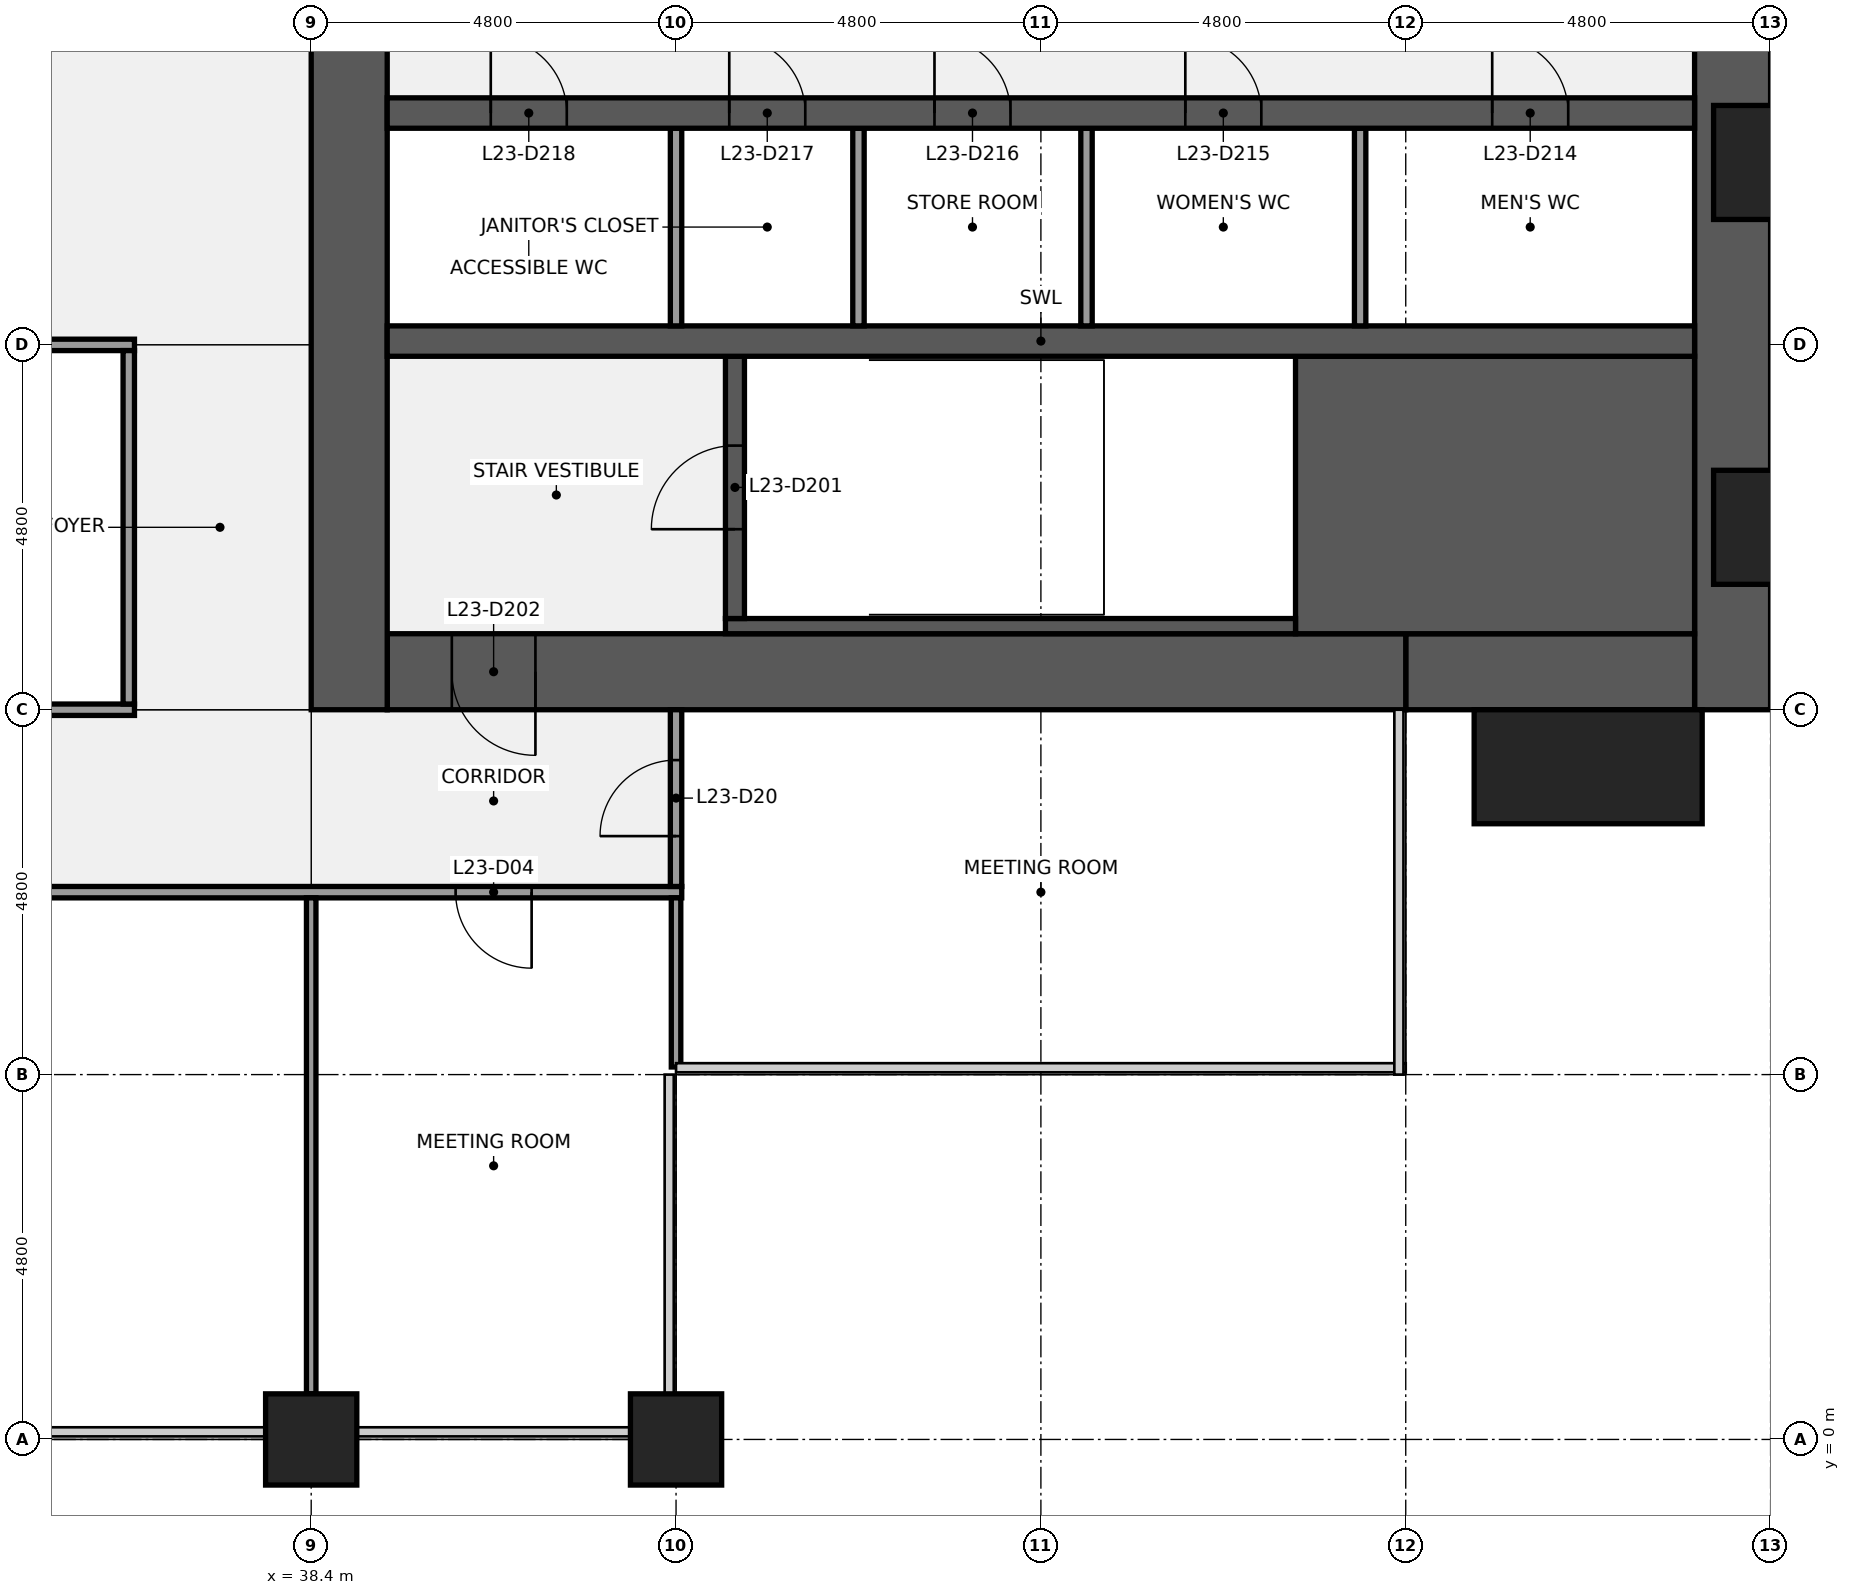
"""IFC4 building model, lengths in metres.
Left out: names, types, materials, properties, quantities, classifications, styles, units other than length and angle.
Written with IfcOpenShell. Run it as: python <this file> out.ifc"""

import sys

from ifc_helpers import new_model, si_unit, direction, frame, frame_2d, origin, origin_2d, place, context, subcontext, project, spatial, rectangle, extrude, element, fill, save


model = new_model("IFC4")
c1 = context("Model", 3, precision=1e-05, world=origin(), true_north=direction((0.0, 1.0)))
c2 = subcontext(c1, "Body", "Model", "MODEL_VIEW")
j1 = project(units=[si_unit("LENGTHUNIT", "METRE"), si_unit("PLANEANGLEUNIT", "RADIAN")], contexts=[c1])
p1 = place(None, origin())
s1 = spatial("IfcSite", under=j1, at=p1, CompositionType="ELEMENT")
p2 = place(p1, origin())
s2 = spatial("IfcBuilding", under=s1, at=p2, CompositionType="ELEMENT")
p3 = place(p2, frame((0.0, 0.0, 112.1)))
s3 = spatial("IfcBuildingStorey", under=s2, at=p3, CompositionType="ELEMENT", Elevation=112.1)
for number, where, z_axis, x_axis in (
    (1, (38.4, 0.0, 0.0), (0.0, 0.0, 1.0), (1.0, 0.0, 0.0)),
    (2, (43.2, 0.0, 0.0), (0.0, 0.0, 1.0), (1.0, 0.0, 0.0)),
):
    element("IfcColumn", number, at=place(p3, frame(where, z_axis=z_axis, x_axis=x_axis)), inside=s3, PredefinedType="COLUMN", context=c2, shape_type="SweptSolid", body=[
        extrude(rectangle(XDim=1.2, YDim=1.2, at=origin_2d()), origin(), (0.0, 0.0, 1.0), 4.0),
    ])
p4 = place(p3, frame((57.1, 38.4, 0.0), z_axis=(0.0, 0.0, 1.0), x_axis=(0.0, -1.0, 0.0)))
e3 = element("IfcWall", 3, at=p4, inside=s3, PredefinedType="SHEAR", context=c2, shape_type="SweptSolid", body=[
    extrude(rectangle(XDim=28.8, YDim=1.0, at=frame_2d((14.4, 0.0))), origin(), (0.0, 0.0, 1.0), 3.84),
])
p5 = place(p4, frame((18.45, 0.0, 0.9)))
e4 = element("IfcOpeningElement", 4, at=p5, cuts=e3, PredefinedType="OPENING", context=c2, shape_type="SweptSolid", body=[
    extrude(rectangle(XDim=1.5, YDim=1.5, at=frame_2d((0.75, 0.75))), frame((0.0, 0.51, 0.0), z_axis=(0.0, -1.0, 0.0), x_axis=(1.0, 0.0, 0.0)), (0.0, 0.0, 1.0), 1.02),
])
p6 = place(p4, frame((8.85, 0.0, 0.9)))
e5 = element("IfcOpeningElement", 5, at=p6, cuts=e3, PredefinedType="OPENING", context=c2, shape_type="SweptSolid", body=[
    extrude(rectangle(XDim=1.5, YDim=1.5, at=frame_2d((0.75, 0.75))), frame((0.0, 0.51, 0.0), z_axis=(0.0, -1.0, 0.0), x_axis=(1.0, 0.0, 0.0)), (0.0, 0.0, 1.0), 1.02),
])
p7 = place(p3, frame((56.6, 10.1, 0.0), z_axis=(0.0, 0.0, 1.0), x_axis=(-1.0, 0.0, 0.0)))
e6 = element("IfcWall", 6, at=p7, inside=s3, PredefinedType="SHEAR", context=c2, shape_type="SweptSolid", body=[
    extrude(rectangle(XDim=3.8, YDim=1.0, at=frame_2d((1.9, 0.0))), origin(), (0.0, 0.0, 1.0), 3.84),
])
p8 = place(p3, frame((52.8, 10.1, 0.0), z_axis=(0.0, 0.0, 1.0), x_axis=(-1.0, 0.0, 0.0)))
e7 = element("IfcWall", 7, at=p8, inside=s3, PredefinedType="SHEAR", context=c2, shape_type="SweptSolid", body=[
    extrude(rectangle(XDim=13.4, YDim=1.0, at=frame_2d((6.7, 0.0))), origin(), (0.0, 0.0, 1.0), 3.84),
])
p9 = place(p8, frame((11.45, 0.0, 0.0)))
e8 = element("IfcOpeningElement", 8, at=p9, cuts=e7, PredefinedType="OPENING", context=c2, shape_type="SweptSolid", body=[
    extrude(rectangle(XDim=1.1, YDim=2.1, at=frame_2d((0.55, 1.05))), frame((0.0, 0.51, 0.0), z_axis=(0.0, -1.0, 0.0), x_axis=(1.0, 0.0, 0.0)), (0.0, 0.0, 1.0), 1.02),
])
p10 = place(p3, frame((38.9, 9.6, 0.0), z_axis=(0.0, 0.0, 1.0), x_axis=(0.0, 1.0, 0.0)))
e9 = element("IfcWall", 9, at=p10, inside=s3, PredefinedType="SHEAR", context=c2, shape_type="SweptSolid", body=[
    extrude(rectangle(XDim=28.8, YDim=1.0, at=frame_2d((14.4, 0.0))), origin(), (0.0, 0.0, 1.0), 3.84),
])
p11 = place(p10, frame((8.7, 0.0, 0.0)))
e10 = element("IfcOpeningElement", 10, at=p11, cuts=e9, PredefinedType="OPENING", context=c2, shape_type="SweptSolid", body=[
    extrude(rectangle(XDim=1.8, YDim=2.1, at=frame_2d((0.9, 1.05))), frame((0.0, 0.51, 0.0), z_axis=(0.0, -1.0, 0.0), x_axis=(1.0, 0.0, 0.0)), (0.0, 0.0, 1.0), 1.02),
])
p12 = place(p10, frame((18.3, 0.0, 0.0)))
e11 = element("IfcOpeningElement", 11, at=p12, cuts=e9, PredefinedType="OPENING", context=c2, shape_type="SweptSolid", body=[
    extrude(rectangle(XDim=1.8, YDim=2.1, at=frame_2d((0.9, 1.05))), frame((0.0, 0.51, 0.0), z_axis=(0.0, -1.0, 0.0), x_axis=(1.0, 0.0, 0.0)), (0.0, 0.0, 1.0), 1.02),
])
p13 = place(p3, frame((51.35, 12.425, 0.0), z_axis=(0.0, 0.0, 1.0), x_axis=(1.0, 0.0, 0.0)))
e12 = element("IfcWall", 12, at=p13, inside=s3, PredefinedType="SHEAR", context=c2, shape_type="SweptSolid", body=[
    extrude(rectangle(XDim=5.25, YDim=3.65, at=frame_2d((2.625, 0.0))), origin(), (0.0, 0.0, 1.0), 3.84),
])
p14 = place(p3, frame((43.85, 10.7, 0.0), z_axis=(0.0, 0.0, 1.0), x_axis=(1.0, 0.0, 0.0)))
e13 = element("IfcWall", 13, at=p14, inside=s3, PredefinedType="SHEAR", context=c2, shape_type="SweptSolid", body=[
    extrude(rectangle(XDim=7.5, YDim=0.2, at=frame_2d((3.75, 0.0))), origin(), (0.0, 0.0, 1.0), 3.84),
])
p15 = place(p3, frame((43.975, 10.8, 0.0), z_axis=(0.0, 0.0, 1.0), x_axis=(0.0, 1.0, 0.0)))
e14 = element("IfcWall", 14, at=p15, inside=s3, PredefinedType="SHEAR", context=c2, shape_type="SweptSolid", body=[
    extrude(rectangle(XDim=3.45, YDim=0.25, at=frame_2d((1.725, 0.0))), origin(), (0.0, 0.0, 1.0), 3.84),
])
p16 = place(p15, frame((1.175, 0.0, 0.0)))
e15 = element("IfcOpeningElement", 15, at=p16, cuts=e14, PredefinedType="OPENING", context=c2, shape_type="SweptSolid", body=[
    extrude(rectangle(XDim=1.1, YDim=2.1, at=frame_2d((0.55, 1.05))), frame((0.0, 0.135, 0.0), z_axis=(0.0, -1.0, 0.0), x_axis=(1.0, 0.0, 0.0)), (0.0, 0.0, 1.0), 0.27),
])
p17 = place(p3, frame((39.4, 14.45, 0.0), z_axis=(0.0, 0.0, 1.0), x_axis=(1.0, 0.0, 0.0)))
e16 = element("IfcWall", 16, at=p17, inside=s3, PredefinedType="SHEAR", context=c2, shape_type="SweptSolid", body=[
    extrude(rectangle(XDim=17.2, YDim=0.4, at=frame_2d((8.6, 0.0))), origin(), (0.0, 0.0, 1.0), 3.84),
])
for number, where, z_axis, x_axis in (
    (17, (52.2, 14.65, 0.0), (0.0, 0.0, 1.0), (0.0, 1.0, 0.0)),
    (18, (48.6, 14.65, 0.0), (0.0, 0.0, 1.0), (0.0, 1.0, 0.0)),
    (19, (45.6, 14.65, 0.0), (0.0, 0.0, 1.0), (0.0, 1.0, 0.0)),
    (20, (43.2, 14.65, 0.0), (0.0, 0.0, 1.0), (0.0, 1.0, 0.0)),
):
    element("IfcWall", number, at=place(p3, frame(where, z_axis=z_axis, x_axis=x_axis)), inside=s3, PredefinedType="PARTITIONING", context=c2, shape_type="SweptSolid", body=[
        extrude(rectangle(XDim=2.6, YDim=0.15, at=frame_2d((1.3, 0.0))), origin(), (0.0, 0.0, 1.0), 3.84),
    ])
p18 = place(p3, frame((39.4, 17.45, 0.0), z_axis=(0.0, 0.0, 1.0), x_axis=(1.0, 0.0, 0.0)))
e21 = element("IfcWall", 21, at=p18, inside=s3, PredefinedType="SHEAR", context=c2, shape_type="SweptSolid", body=[
    extrude(rectangle(XDim=17.2, YDim=0.4, at=frame_2d((8.6, 0.0))), origin(), (0.0, 0.0, 1.0), 3.84),
])
p19 = place(p18, frame((14.538, 0.0, 0.0)))
e22 = element("IfcOpeningElement", 22, at=p19, cuts=e21, PredefinedType="OPENING", context=c2, shape_type="SweptSolid", body=[
    extrude(rectangle(XDim=1.0, YDim=2.1, at=frame_2d((0.5, 1.05))), frame((0.0, 0.21, 0.0), z_axis=(0.0, -1.0, 0.0), x_axis=(1.0, 0.0, 0.0)), (0.0, 0.0, 1.0), 0.42),
])
p20 = place(p18, frame((10.5, 0.0, 0.0)))
e23 = element("IfcOpeningElement", 23, at=p20, cuts=e21, PredefinedType="OPENING", context=c2, shape_type="SweptSolid", body=[
    extrude(rectangle(XDim=1.0, YDim=2.1, at=frame_2d((0.5, 1.05))), frame((0.0, 0.21, 0.0), z_axis=(0.0, -1.0, 0.0), x_axis=(1.0, 0.0, 0.0)), (0.0, 0.0, 1.0), 0.42),
])
p21 = place(p18, frame((7.2, 0.0, 0.0)))
e24 = element("IfcOpeningElement", 24, at=p21, cuts=e21, PredefinedType="OPENING", context=c2, shape_type="SweptSolid", body=[
    extrude(rectangle(XDim=1.0, YDim=2.1, at=frame_2d((0.5, 1.05))), frame((0.0, 0.21, 0.0), z_axis=(0.0, -1.0, 0.0), x_axis=(1.0, 0.0, 0.0)), (0.0, 0.0, 1.0), 0.42),
])
p22 = place(p18, frame((4.5, 0.0, 0.0)))
e25 = element("IfcOpeningElement", 25, at=p22, cuts=e21, PredefinedType="OPENING", context=c2, shape_type="SweptSolid", body=[
    extrude(rectangle(XDim=1.0, YDim=2.1, at=frame_2d((0.5, 1.05))), frame((0.0, 0.21, 0.0), z_axis=(0.0, -1.0, 0.0), x_axis=(1.0, 0.0, 0.0)), (0.0, 0.0, 1.0), 0.42),
])
p23 = place(p18, frame((1.363, 0.0, 0.0)))
e26 = element("IfcOpeningElement", 26, at=p23, cuts=e21, PredefinedType="OPENING", context=c2, shape_type="SweptSolid", body=[
    extrude(rectangle(XDim=1.0, YDim=2.1, at=frame_2d((0.5, 1.05))), frame((0.0, 0.21, 0.0), z_axis=(0.0, -1.0, 0.0), x_axis=(1.0, 0.0, 0.0)), (0.0, 0.0, 1.0), 0.42),
])
p24 = place(p3, frame((14.325, 7.2, 0.0), z_axis=(0.0, 0.0, 1.0), x_axis=(1.0, 0.0, 0.0)))
e27 = element("IfcWall", 27, at=p24, inside=s3, PredefinedType="PARTITIONING", context=c2, shape_type="SweptSolid", body=[
    extrude(rectangle(XDim=28.95, YDim=0.15, at=frame_2d((14.475, 0.0))), origin(), (0.0, 0.0, 1.0), 2.849),
])
p25 = place(p24, frame((1.975, 0.0, 0.0)))
e28 = element("IfcOpeningElement", 28, at=p25, cuts=e27, PredefinedType="OPENING", context=c2, shape_type="SweptSolid", body=[
    extrude(rectangle(XDim=1.0, YDim=2.1, at=frame_2d((0.5, 1.05))), frame((0.0, 0.085, 0.0), z_axis=(0.0, -1.0, 0.0), x_axis=(1.0, 0.0, 0.0)), (0.0, 0.0, 1.0), 0.17),
])
p26 = place(p24, frame((9.175, 0.0, 0.0)))
e29 = element("IfcOpeningElement", 29, at=p26, cuts=e27, PredefinedType="OPENING", context=c2, shape_type="SweptSolid", body=[
    extrude(rectangle(XDim=1.0, YDim=2.1, at=frame_2d((0.5, 1.05))), frame((0.0, 0.085, 0.0), z_axis=(0.0, -1.0, 0.0), x_axis=(1.0, 0.0, 0.0)), (0.0, 0.0, 1.0), 0.17),
])
p27 = place(p24, frame((18.775, 0.0, 0.0)))
e30 = element("IfcOpeningElement", 30, at=p27, cuts=e27, PredefinedType="OPENING", context=c2, shape_type="SweptSolid", body=[
    extrude(rectangle(XDim=1.0, YDim=2.1, at=frame_2d((0.5, 1.05))), frame((0.0, 0.085, 0.0), z_axis=(0.0, -1.0, 0.0), x_axis=(1.0, 0.0, 0.0)), (0.0, 0.0, 1.0), 0.17),
])
p28 = place(p24, frame((25.975, 0.0, 0.0)))
e31 = element("IfcOpeningElement", 31, at=p28, cuts=e27, PredefinedType="OPENING", context=c2, shape_type="SweptSolid", body=[
    extrude(rectangle(XDim=1.0, YDim=2.1, at=frame_2d((0.5, 1.05))), frame((0.0, 0.085, 0.0), z_axis=(0.0, -1.0, 0.0), x_axis=(1.0, 0.0, 0.0)), (0.0, 0.0, 1.0), 0.17),
])
p29 = place(p3, frame((21.525, 9.6, 0.0), z_axis=(0.0, 0.0, 1.0), x_axis=(1.0, 0.0, 0.0)))
e32 = element("IfcWall", 32, at=p29, inside=s3, PredefinedType="PARTITIONING", context=c2, shape_type="SweptSolid", body=[
    extrude(rectangle(XDim=14.55, YDim=0.15, at=frame_2d((7.275, 0.0))), origin(), (0.0, 0.0, 1.0), 2.849),
])
p30 = place(p29, frame((3.175, 0.0, 0.0)))
e33 = element("IfcOpeningElement", 33, at=p30, cuts=e32, PredefinedType="OPENING", context=c2, shape_type="SweptSolid", body=[
    extrude(rectangle(XDim=1.0, YDim=2.1, at=frame_2d((0.5, 1.05))), frame((0.0, 0.085, 0.0), z_axis=(0.0, -1.0, 0.0), x_axis=(1.0, 0.0, 0.0)), (0.0, 0.0, 1.0), 0.17),
])
p31 = place(p29, frame((10.375, 0.0, 0.0)))
e34 = element("IfcOpeningElement", 34, at=p31, cuts=e32, PredefinedType="OPENING", context=c2, shape_type="SweptSolid", body=[
    extrude(rectangle(XDim=1.0, YDim=2.1, at=frame_2d((0.5, 1.05))), frame((0.0, 0.085, 0.0), z_axis=(0.0, -1.0, 0.0), x_axis=(1.0, 0.0, 0.0)), (0.0, 0.0, 1.0), 0.17),
])
p32 = place(p3, frame((33.675, 14.4, 0.0), z_axis=(0.0, 0.0, 1.0), x_axis=(1.0, 0.0, 0.0)))
e35 = element("IfcWall", 35, at=p32, inside=s3, PredefinedType="PARTITIONING", context=c2, shape_type="SweptSolid", body=[
    extrude(rectangle(XDim=2.4, YDim=0.15, at=frame_2d((1.2, 0.0))), origin(), (0.0, 0.0, 1.0), 2.849),
])
p33 = place(p3, frame((36.0, 9.675, 0.0), z_axis=(0.0, 0.0, 1.0), x_axis=(0.0, 1.0, 0.0)))
e36 = element("IfcWall", 36, at=p33, inside=s3, PredefinedType="PARTITIONING", context=c2, shape_type="SweptSolid", body=[
    extrude(rectangle(XDim=4.65, YDim=0.15, at=frame_2d((2.325, 0.0))), origin(), (0.0, 0.0, 1.0), 2.849),
])
p34 = place(p3, frame((38.4, 0.6, 0.0), z_axis=(0.0, 0.0, 1.0), x_axis=(0.0, 1.0, 0.0)))
e37 = element("IfcWall", 37, at=p34, inside=s3, PredefinedType="PARTITIONING", context=c2, shape_type="SweptSolid", body=[
    extrude(rectangle(XDim=6.525, YDim=0.125, at=frame_2d((3.262, 0.0))), origin(), (0.0, 0.0, 1.0), 2.849),
])
p35 = place(p3, frame((43.2, 4.9, 0.0), z_axis=(0.0, 0.0, 1.0), x_axis=(0.0, 1.0, 0.0)))
e38 = element("IfcWall", 38, at=p35, inside=s3, PredefinedType="PARTITIONING", context=c2, shape_type="SweptSolid", body=[
    extrude(rectangle(XDim=2.225, YDim=0.125, at=frame_2d((1.113, 0.0))), origin(), (0.0, 0.0, 1.0), 2.849),
])
p36 = place(p3, frame((43.2, 7.275, 0.0), z_axis=(0.0, 0.0, 1.0), x_axis=(0.0, 1.0, 0.0)))
e39 = element("IfcWall", 39, at=p36, inside=s3, PredefinedType="PARTITIONING", context=c2, shape_type="SweptSolid", body=[
    extrude(rectangle(XDim=2.325, YDim=0.15, at=frame_2d((1.163, 0.0))), origin(), (0.0, 0.0, 1.0), 2.849),
])
p37 = place(p36, frame((0.663, 0.0, 0.0)))
e40 = element("IfcOpeningElement", 40, at=p37, cuts=e39, PredefinedType="OPENING", context=c2, shape_type="SweptSolid", body=[
    extrude(rectangle(XDim=1.0, YDim=2.1, at=frame_2d((0.5, 1.05))), frame((0.0, 0.085, 0.0), z_axis=(0.0, -1.0, 0.0), x_axis=(1.0, 0.0, 0.0)), (0.0, 0.0, 1.0), 0.17),
])
p38 = place(p3, frame((55.2, 8.85, 0.0), z_axis=(0.0, 0.0, 1.0), x_axis=(1.0, 0.0, 0.0)))
e41 = element("IfcColumn", 41, at=p38, inside=s3, PredefinedType="PILASTER", context=c2, shape_type="SweptSolid", body=[
    extrude(rectangle(XDim=3.0, YDim=1.5, at=origin_2d()), origin(), (0.0, 0.0, 1.0), 4.0),
])
for number, where, z_axis, x_axis in (
    (42, (38.4, -1.05, 0.0), (0.0, 0.0, 1.0), (1.0, 0.0, 0.0)),
    (43, (43.2, -1.05, 0.0), (0.0, 0.0, 1.0), (1.0, 0.0, 0.0)),
):
    element("IfcColumn", number, at=place(p3, frame(where, z_axis=z_axis, x_axis=x_axis)), inside=s3, PredefinedType="PILASTER", context=c2, shape_type="SweptSolid", body=[
        extrude(rectangle(XDim=3.6, YDim=0.9, at=origin_2d()), origin(), (0.0, 0.0, 1.0), 4.0),
    ])
p39 = place(p16, origin())
e44 = element("IfcDoor", 44, at=p39, inside=s3, OperationType="SINGLE_SWING_LEFT", PredefinedType="DOOR", context=c2, shape_type="SweptSolid", body=[
    extrude(rectangle(XDim=1.1, YDim=2.1, at=frame_2d((0.55, 1.05))), frame((0.0, 0.025, 0.0), z_axis=(0.0, -1.0, 0.0), x_axis=(1.0, 0.0, 0.0)), (0.0, 0.0, 1.0), 0.05),
])
fill(e15, e44)
p40 = place(p9, origin())
e45 = element("IfcDoor", 45, at=p40, inside=s3, OperationType="SINGLE_SWING_LEFT", PredefinedType="DOOR", context=c2, shape_type="SweptSolid", body=[
    extrude(rectangle(XDim=1.1, YDim=2.1, at=frame_2d((0.55, 1.05))), frame((0.0, 0.025, 0.0), z_axis=(0.0, -1.0, 0.0), x_axis=(1.0, 0.0, 0.0)), (0.0, 0.0, 1.0), 0.05),
])
fill(e8, e45)
p41 = place(p19, origin())
e46 = element("IfcDoor", 46, at=p41, inside=s3, OperationType="SINGLE_SWING_LEFT", PredefinedType="DOOR", context=c2, shape_type="SweptSolid", body=[
    extrude(rectangle(XDim=1.0, YDim=2.1, at=frame_2d((0.5, 1.05))), frame((0.0, 0.025, 0.0), z_axis=(0.0, -1.0, 0.0), x_axis=(1.0, 0.0, 0.0)), (0.0, 0.0, 1.0), 0.05),
])
fill(e22, e46)
p42 = place(p20, origin())
e47 = element("IfcDoor", 47, at=p42, inside=s3, OperationType="SINGLE_SWING_LEFT", PredefinedType="DOOR", context=c2, shape_type="SweptSolid", body=[
    extrude(rectangle(XDim=1.0, YDim=2.1, at=frame_2d((0.5, 1.05))), frame((0.0, 0.025, 0.0), z_axis=(0.0, -1.0, 0.0), x_axis=(1.0, 0.0, 0.0)), (0.0, 0.0, 1.0), 0.05),
])
fill(e23, e47)
p43 = place(p21, origin())
e48 = element("IfcDoor", 48, at=p43, inside=s3, OperationType="SINGLE_SWING_LEFT", PredefinedType="DOOR", context=c2, shape_type="SweptSolid", body=[
    extrude(rectangle(XDim=1.0, YDim=2.1, at=frame_2d((0.5, 1.05))), frame((0.0, 0.025, 0.0), z_axis=(0.0, -1.0, 0.0), x_axis=(1.0, 0.0, 0.0)), (0.0, 0.0, 1.0), 0.05),
])
fill(e24, e48)
p44 = place(p22, origin())
e49 = element("IfcDoor", 49, at=p44, inside=s3, OperationType="SINGLE_SWING_LEFT", PredefinedType="DOOR", context=c2, shape_type="SweptSolid", body=[
    extrude(rectangle(XDim=1.0, YDim=2.1, at=frame_2d((0.5, 1.05))), frame((0.0, 0.025, 0.0), z_axis=(0.0, -1.0, 0.0), x_axis=(1.0, 0.0, 0.0)), (0.0, 0.0, 1.0), 0.05),
])
fill(e25, e49)
p45 = place(p23, origin())
e50 = element("IfcDoor", 50, at=p45, inside=s3, OperationType="SINGLE_SWING_LEFT", PredefinedType="DOOR", context=c2, shape_type="SweptSolid", body=[
    extrude(rectangle(XDim=1.0, YDim=2.1, at=frame_2d((0.5, 1.05))), frame((0.0, 0.025, 0.0), z_axis=(0.0, -1.0, 0.0), x_axis=(1.0, 0.0, 0.0)), (0.0, 0.0, 1.0), 0.05),
])
fill(e26, e50)
p46 = place(p28, origin())
e51 = element("IfcDoor", 51, at=p46, inside=s3, OperationType="SINGLE_SWING_RIGHT", PredefinedType="DOOR", context=c2, shape_type="SweptSolid", body=[
    extrude(rectangle(XDim=1.0, YDim=2.1, at=frame_2d((0.5, 1.05))), frame((0.0, 0.025, 0.0), z_axis=(0.0, -1.0, 0.0), x_axis=(1.0, 0.0, 0.0)), (0.0, 0.0, 1.0), 0.05),
])
fill(e31, e51)
p47 = place(p37, origin())
e52 = element("IfcDoor", 52, at=p47, inside=s3, OperationType="SINGLE_SWING_LEFT", PredefinedType="DOOR", context=c2, shape_type="SweptSolid", body=[
    extrude(rectangle(XDim=1.0, YDim=2.1, at=frame_2d((0.5, 1.05))), frame((0.0, 0.025, 0.0), z_axis=(0.0, -1.0, 0.0), x_axis=(1.0, 0.0, 0.0)), (0.0, 0.0, 1.0), 0.05),
])
fill(e40, e52)
save(model, sys.argv[1])
